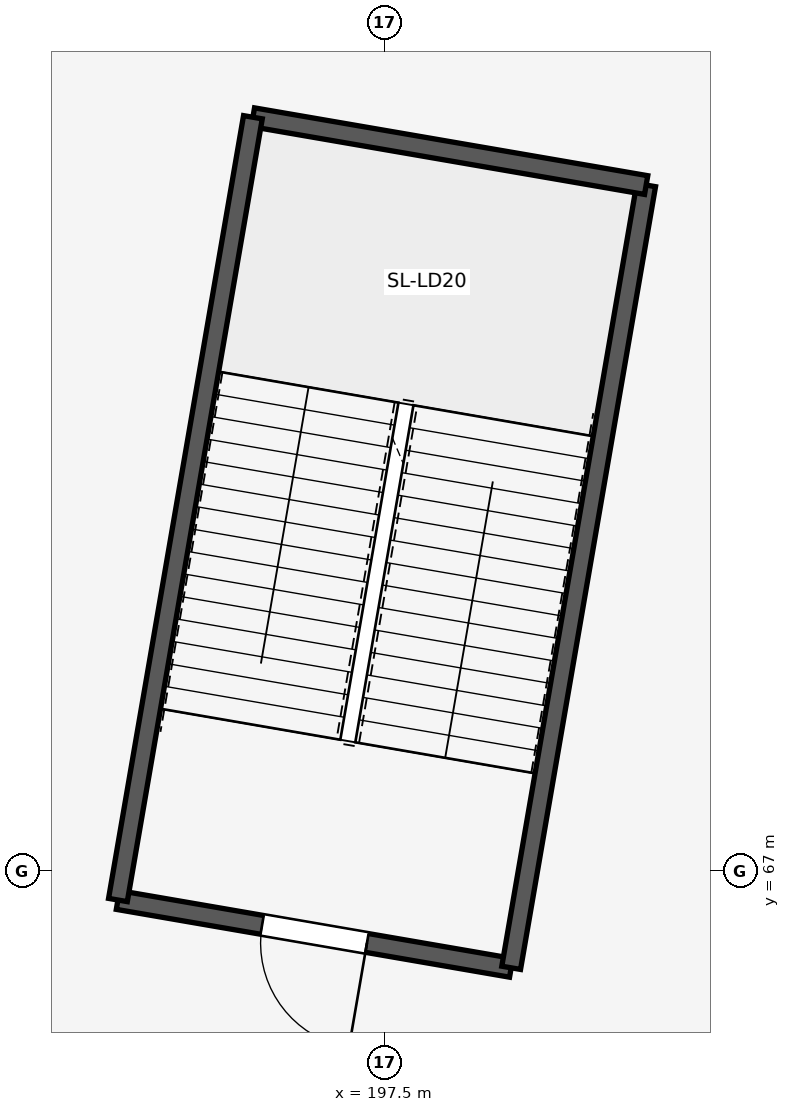
"""IFC4 building model, lengths in metres.
Left out: names, types, materials, properties, quantities, classifications, styles, units other than length and angle.
Written with IfcOpenShell. Run it as: python <this file> out.ifc"""

import sys

from ifc_helpers import new_model, si_unit, direction, frame, frame_2d, origin, place, context, subcontext, project, spatial, rectangle, extrude, element, fill, save


model = new_model("IFC4")
c1 = context("Model", 3, precision=1e-05, world=origin(), true_north=direction((0.0, 1.0)))
c2 = subcontext(c1, "Body", "Model", "MODEL_VIEW")
j1 = project(units=[si_unit("LENGTHUNIT", "METRE"), si_unit("PLANEANGLEUNIT", "RADIAN")], contexts=[c1])
p1 = place(None, origin())
s1 = spatial("IfcSite", under=j1, at=p1, CompositionType="ELEMENT")
p2 = place(p1, origin())
s2 = spatial("IfcBuilding", under=s1, at=p2, CompositionType="ELEMENT")
p3 = place(p2, frame((0.0, 0.0, 5.4)))
s3 = spatial("IfcBuildingStorey", under=s2, at=p3, CompositionType="ELEMENT", Elevation=5.4)
p4 = place(p3, frame((193.987, 66.625, 0.0), z_axis=(0.0, 0.0, 1.0), x_axis=(0.985457162135, -0.16992404655, 0.0)))
e1 = element("IfcWall", 1, at=p4, inside=s3, PredefinedType="SHEAR", context=c2, shape_type="SweptSolid", body=[
    extrude(rectangle(XDim=5.25, YDim=0.25, at=frame_2d((2.625, 0.0))), origin(), (0.0, 0.0, 1.0), 4.92),
])
p5 = place(p4, frame((1.925, 0.0, 0.0)))
e2 = element("IfcOpeningElement", 2, at=p5, cuts=e1, PredefinedType="OPENING", context=c2, shape_type="SweptSolid", body=[
    extrude(rectangle(XDim=1.4, YDim=2.2, at=frame_2d((0.7, 1.1))), frame((0.0, 0.135, 0.0), z_axis=(0.0, -1.0, 0.0), x_axis=(1.0, 0.0, 0.0)), (0.0, 0.0, 1.0), 0.27),
])
p6 = place(p3, frame((199.16, 65.733, 0.0), z_axis=(0.0, 0.0, 1.0), x_axis=(0.169938992676, 0.985454584833, 0.0)))
e3 = element("IfcWall", 3, at=p6, inside=s3, PredefinedType="SHEAR", context=c2, shape_type="SweptSolid", body=[
    extrude(rectangle(XDim=10.45, YDim=0.25, at=frame_2d((5.225, 0.0))), origin(), (0.0, 0.0, 1.0), 4.92),
])
p7 = place(p3, frame((200.936, 76.031, 0.0), z_axis=(0.0, 0.0, 1.0), x_axis=(-0.985458504796, 0.169916259745, 0.0)))
e4 = element("IfcWall", 4, at=p7, inside=s3, PredefinedType="SHEAR", context=c2, shape_type="SweptSolid", body=[
    extrude(rectangle(XDim=5.25, YDim=0.25, at=frame_2d((2.625, 0.0))), origin(), (0.0, 0.0, 1.0), 4.92),
])
p8 = place(p3, frame((195.762, 76.923, 0.0), z_axis=(0.0, 0.0, 1.0), x_axis=(-0.16991630471, -0.985458497043, 0.0)))
e5 = element("IfcWall", 5, at=p8, inside=s3, PredefinedType="SHEAR", context=c2, shape_type="SweptSolid", body=[
    extrude(rectangle(XDim=10.45, YDim=0.25, at=frame_2d((5.225, 0.0))), origin(), (0.0, 0.0, 1.0), 4.92),
])
p9 = place(p5, frame((1.4, 0.0, 0.0), z_axis=(0.0, 0.0, 1.0), x_axis=(-1.0, 0.0, 0.0)))
e6 = element("IfcDoor", 6, at=p9, inside=s3, OperationType="SINGLE_SWING_LEFT", PredefinedType="DOOR", context=c2, shape_type="SweptSolid", body=[
    extrude(rectangle(XDim=1.4, YDim=2.2, at=frame_2d((0.7, 1.1))), frame((0.0, 0.025, 0.0), z_axis=(0.0, -1.0, 0.0), x_axis=(1.0, 0.0, 0.0)), (0.0, 0.0, 1.0), 0.05),
])
fill(e2, e6)
save(model, sys.argv[1])
